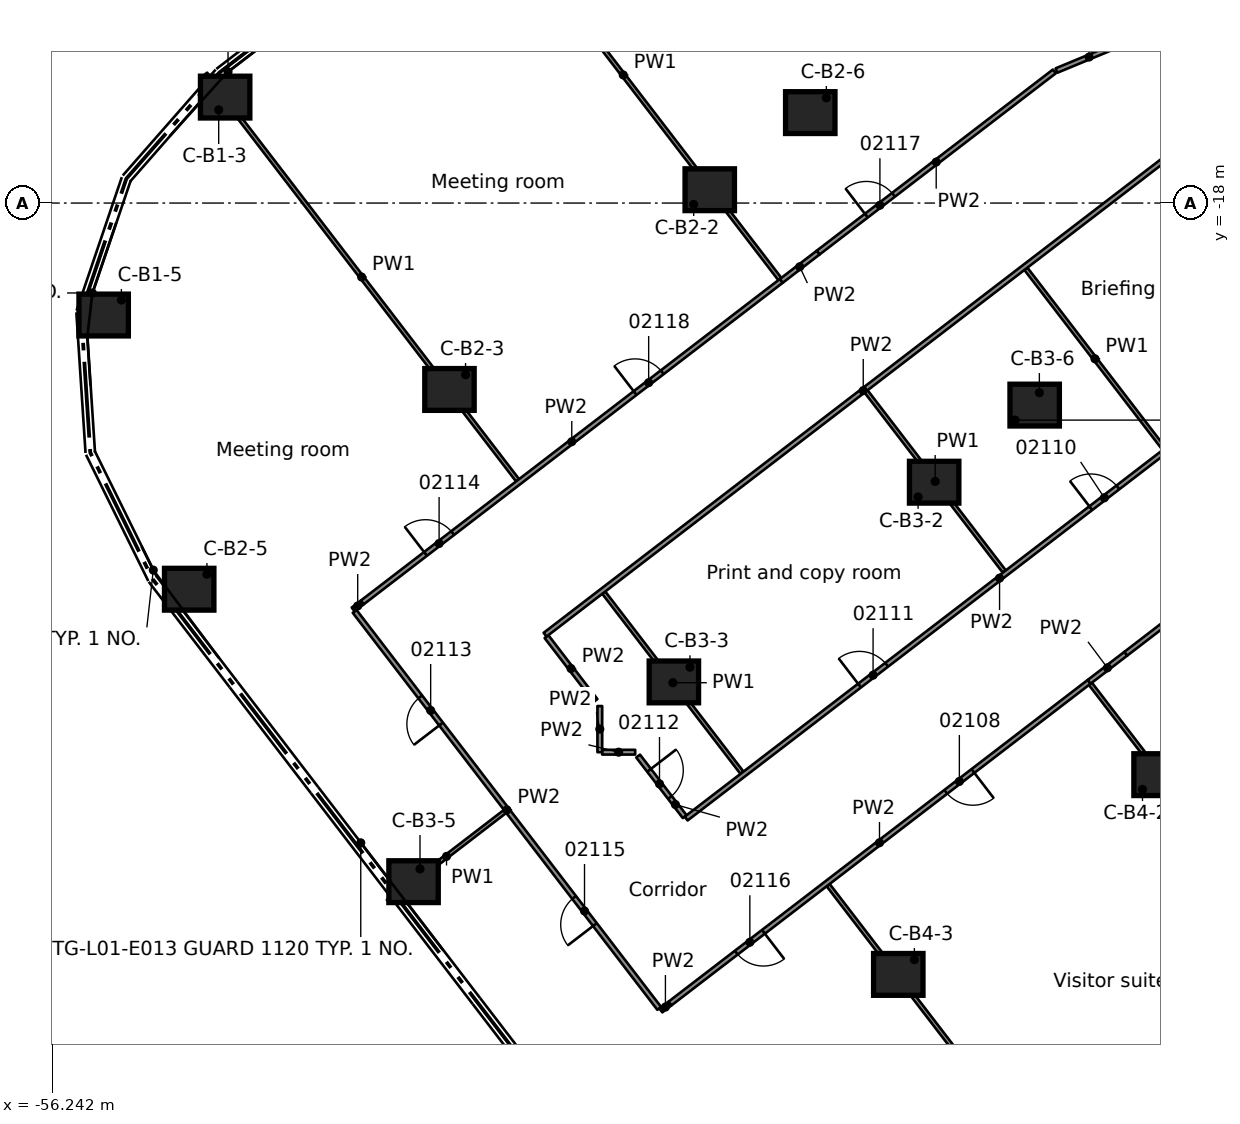
"""IFC4 building model, lengths in metres.
Left out: names, types, materials, properties, quantities, classifications, styles, units other than length and angle.
Written with IfcOpenShell. Run it as: python <this file> out.ifc"""

import sys

from ifc_helpers import new_model, si_unit, direction, frame, frame_2d, origin, origin_2d, place, context, subcontext, project, spatial, rectangle, extrude, element, fill, save


model = new_model("IFC4")
c1 = context("Model", 3, precision=1e-05, world=origin(), true_north=direction((0.0, 1.0)))
c2 = subcontext(c1, "Body", "Model", "MODEL_VIEW")
j1 = project(units=[si_unit("LENGTHUNIT", "METRE"), si_unit("PLANEANGLEUNIT", "RADIAN")], contexts=[c1])
p1 = place(None, origin())
s1 = spatial("IfcSite", under=j1, at=p1, CompositionType="ELEMENT")
p2 = place(p1, origin())
s2 = spatial("IfcBuilding", under=s1, at=p2, CompositionType="ELEMENT")
p3 = place(p2, frame((0.0, 0.0, 10.5)))
s3 = spatial("IfcBuildingStorey", under=s2, at=p3, CompositionType="ELEMENT", Elevation=10.5)
for number, where, z_axis, x_axis in (
    (1, (-51.687, -15.212, -1.0), (0.0, 0.0, 1.0), (0.707, 0.707, 0.0)),
    (2, (-54.884, -20.946, -1.0), (0.0, 0.0, 1.0), (0.707, 0.707, 0.0)),
):
    element("IfcColumn", number, at=place(p3, frame(where, z_axis=z_axis, x_axis=x_axis)), inside=s3, PredefinedType="COLUMN", context=c2, shape_type="SweptSolid", body=[
        extrude(rectangle(XDim=3.4, YDim=3.4, at=origin_2d()), origin(), (0.0, 0.0, 1.0), 1.0),
    ])
p4 = place(p3, frame((-38.935, -17.649, -1.0), z_axis=(0.0, 0.0, 1.0), x_axis=(0.707106781187, 0.707106781187, 0.0)))
e3 = element("IfcColumn", 3, at=p4, inside=s3, PredefinedType="COLUMN", context=c2, shape_type="SweptSolid", body=[
    extrude(rectangle(XDim=3.25, YDim=3.25, at=origin_2d()), origin(), (0.0, 0.0, 1.0), 1.0),
])
for number, where, z_axis, x_axis in (
    (4, (-45.784, -22.905, -1.0), (0.0, 0.0, 1.0), (0.707, 0.707, 0.0)),
    (5, (-52.633, -28.161, -1.0), (0.0, 0.0, 1.0), (0.707, 0.707, 0.0)),
):
    element("IfcColumn", number, at=place(p3, frame(where, z_axis=z_axis, x_axis=x_axis)), inside=s3, PredefinedType="COLUMN", context=c2, shape_type="SweptSolid", body=[
        extrude(rectangle(XDim=3.4, YDim=3.4, at=origin_2d()), origin(), (0.0, 0.0, 1.0), 1.0),
    ])
for number, where, z_axis, x_axis in (
    (6, (-36.29, -15.62, -1.0), (0.0, 0.0, 1.0), (0.707, 0.707, 0.0)),
    (7, (-33.03, -25.345, -1.0), (0.0, 0.0, 1.0), (0.707, 0.707, 0.0)),
):
    element("IfcColumn", number, at=place(p3, frame(where, z_axis=z_axis, x_axis=x_axis)), inside=s3, PredefinedType="COLUMN", context=c2, shape_type="SweptSolid", body=[
        extrude(rectangle(XDim=3.25, YDim=3.25, at=origin_2d()), origin(), (0.0, 0.0, 1.0), 1.0),
    ])
for number, where, z_axis, x_axis in (
    (8, (-39.879, -30.6, -1.0), (0.0, 0.0, 1.0), (0.707, 0.707, 0.0)),
    (9, (-46.729, -35.856, -1.0), (0.0, 0.0, 1.0), (0.707, 0.707, 0.0)),
):
    element("IfcColumn", number, at=place(p3, frame(where, z_axis=z_axis, x_axis=x_axis)), inside=s3, PredefinedType="COLUMN", context=c2, shape_type="SweptSolid", body=[
        extrude(rectangle(XDim=3.4, YDim=3.4, at=origin_2d()), origin(), (0.0, 0.0, 1.0), 1.0),
    ])
for number, where, z_axis, x_axis in (
    (10, (-30.385, -23.316, -1.0), (0.0, 0.0, 1.0), (0.707, 0.707, 0.0)),
    (11, (-27.125, -33.04, -1.0), (0.0, 0.0, 1.0), (0.707, 0.707, 0.0)),
):
    element("IfcColumn", number, at=place(p3, frame(where, z_axis=z_axis, x_axis=x_axis)), inside=s3, PredefinedType="COLUMN", context=c2, shape_type="SweptSolid", body=[
        extrude(rectangle(XDim=3.25, YDim=3.25, at=origin_2d()), origin(), (0.0, 0.0, 1.0), 1.0),
    ])
for number, where, z_axis, x_axis in (
    (12, (-33.974, -38.296, -1.0), (0.0, 0.0, 1.0), (0.707, 0.707, 0.0)),
    (13, (-29.4, -12.178, -1.0), (0.0, 0.0, 1.0), (0.707, 0.707, 0.0)),
):
    element("IfcColumn", number, at=place(p3, frame(where, z_axis=z_axis, x_axis=x_axis)), inside=s3, PredefinedType="COLUMN", context=c2, shape_type="SweptSolid", body=[
        extrude(rectangle(XDim=3.4, YDim=3.4, at=origin_2d()), origin(), (0.0, 0.0, 1.0), 1.0),
    ])
for number, where, z_axis, x_axis in (
    (14, (-51.687, -15.212, 0.0), (0.0, 0.0, 1.0), (1.0, 0.0, 0.0)),
    (15, (-54.884, -20.946, 0.0), (0.0, 0.0, 1.0), (1.0, 0.0, 0.0)),
    (16, (-38.935, -17.649, 0.0), (0.0, 0.0, 1.0), (1.0, 0.0, 0.0)),
    (17, (-45.784, -22.905, 0.0), (0.0, 0.0, 1.0), (1.0, 0.0, 0.0)),
    (18, (-52.633, -28.161, 0.0), (0.0, 0.0, 1.0), (1.0, 0.0, 0.0)),
    (19, (-36.29, -15.62, 0.0), (0.0, 0.0, 1.0), (1.0, 0.0, 0.0)),
    (20, (-33.03, -25.345, 0.0), (0.0, 0.0, 1.0), (1.0, 0.0, 0.0)),
    (21, (-39.879, -30.6, 0.0), (0.0, 0.0, 1.0), (1.0, 0.0, 0.0)),
    (22, (-46.729, -35.856, 0.0), (0.0, 0.0, 1.0), (1.0, 0.0, 0.0)),
    (23, (-30.385, -23.316, 0.0), (0.0, 0.0, 1.0), (1.0, 0.0, 0.0)),
    (24, (-27.125, -33.04, 0.0), (0.0, 0.0, 1.0), (1.0, 0.0, 0.0)),
    (25, (-33.974, -38.296, 0.0), (0.0, 0.0, 1.0), (1.0, 0.0, 0.0)),
):
    element("IfcColumn", number, at=place(p3, frame(where, z_axis=z_axis, x_axis=x_axis)), inside=s3, PredefinedType="COLUMN", context=c2, shape_type="SweptSolid", body=[
        extrude(rectangle(XDim=1.3, YDim=1.1, at=origin_2d()), origin(), (0.0, 0.0, 1.0), 5.0),
    ])
p5 = place(p3, frame((-40.264, -39.191, 0.0), z_axis=(0.0, 0.0, 1.0), x_axis=(-0.608717571556, 0.793386991373, 0.0)))
e26 = element("IfcWall", 26, at=p5, inside=s3, PredefinedType="PARTITIONING", context=c2, shape_type="SweptSolid", body=[
    extrude(rectangle(XDim=13.169, YDim=0.125, at=frame_2d((6.584, 0.0))), origin(), (0.0, 0.0, 1.0), 4.58),
])
p6 = place(p5, frame((9.431, 0.0, 0.0)))
e27 = element("IfcOpeningElement", 27, at=p6, cuts=e26, PredefinedType="OPENING", context=c2, shape_type="SweptSolid", body=[
    extrude(rectangle(XDim=0.9, YDim=2.1, at=frame_2d((0.45, 1.05))), frame((0.0, 0.073, 0.0), z_axis=(0.0, -1.0, 0.0), x_axis=(1.0, 0.0, 0.0)), (0.0, 0.0, 1.0), 0.145),
])
p7 = place(p5, frame((2.781, 0.0, 0.0)))
e28 = element("IfcOpeningElement", 28, at=p7, cuts=e26, PredefinedType="OPENING", context=c2, shape_type="SweptSolid", body=[
    extrude(rectangle(XDim=0.9, YDim=2.1, at=frame_2d((0.45, 1.05))), frame((0.0, 0.073, 0.0), z_axis=(0.0, -1.0, 0.0), x_axis=(1.0, 0.0, 0.0)), (0.0, 0.0, 1.0), 0.145),
])
p8 = place(p3, frame((-43.231, -29.408, 0.0), z_axis=(0.0, 0.0, 1.0), x_axis=(0.608774942854, -0.79334297057, 0.0)))
e29 = element("IfcWall", 29, at=p8, inside=s3, PredefinedType="PARTITIONING", context=c2, shape_type="SweptSolid", body=[
    extrude(rectangle(XDim=2.119, YDim=0.125, at=frame_2d((1.06, 0.0))), origin(), (0.0, 0.0, 1.0), 4.58),
])
p9 = place(p3, frame((-40.82, -32.551, 0.0), z_axis=(0.0, 0.0, 1.0), x_axis=(0.609452676656, -0.792822448545, 0.0)))
e30 = element("IfcWall", 30, at=p9, inside=s3, PredefinedType="PARTITIONING", context=c2, shape_type="SweptSolid", body=[
    extrude(rectangle(XDim=2.012, YDim=0.125, at=frame_2d((1.006, 0.0))), origin(), (0.0, 0.0, 1.0), 4.58),
])
p10 = place(p9, frame((0.473, 0.0, 0.0)))
e31 = element("IfcOpeningElement", 31, at=p10, cuts=e30, PredefinedType="OPENING", context=c2, shape_type="SweptSolid", body=[
    extrude(rectangle(XDim=0.9, YDim=2.1, at=frame_2d((0.45, 1.05))), frame((0.0, 0.073, 0.0), z_axis=(0.0, -1.0, 0.0), x_axis=(1.0, 0.0, 0.0)), (0.0, 0.0, 1.0), 0.145),
])
p11 = place(p3, frame((-52.2, -14.599, 0.0), z_axis=(0.0, 0.0, 1.0), x_axis=(0.608835217765, -0.793296714735, 0.0)))
e32 = element("IfcWall", 32, at=p11, inside=s3, PredefinedType="PARTITIONING", context=c2, shape_type="SweptSolid", body=[
    extrude(rectangle(XDim=13.481, YDim=0.1, at=frame_2d((6.741, 0.0))), origin(), (0.0, 0.0, 1.0), 4.58),
])
p12 = place(p3, frame((-41.724, -28.252, 0.0), z_axis=(0.0, 0.0, 1.0), x_axis=(0.608928252062, -0.793225304589, 0.0)))
e33 = element("IfcWall", 33, at=p12, inside=s3, PredefinedType="PARTITIONING", context=c2, shape_type="SweptSolid", body=[
    extrude(rectangle(XDim=5.973, YDim=0.1, at=frame_2d((2.987, 0.0))), origin(), (0.0, 0.0, 1.0), 4.58),
])
p13 = place(p3, frame((-35.819, -35.947, 0.0), z_axis=(0.0, 0.0, 1.0), x_axis=(0.608745897366, -0.793365257898, 0.0)))
e34 = element("IfcWall", 34, at=p13, inside=s3, PredefinedType="PARTITIONING", context=c2, shape_type="SweptSolid", body=[
    extrude(rectangle(XDim=13.482, YDim=0.1, at=frame_2d((6.741, 0.0))), origin(), (0.0, 0.0, 1.0), 4.58),
])
p14 = place(p3, frame((-45.332, -9.26, 0.0), z_axis=(0.0, 0.0, 1.0), x_axis=(0.608825648604, -0.793304058733, 0.0)))
e35 = element("IfcWall", 35, at=p14, inside=s3, PredefinedType="PARTITIONING", context=c2, shape_type="SweptSolid", body=[
    extrude(rectangle(XDim=13.536, YDim=0.1, at=frame_2d((6.768, 0.0))), origin(), (0.0, 0.0, 1.0), 4.58),
])
p15 = place(p3, frame((-34.822, -22.955, 0.0), z_axis=(0.0, 0.0, 1.0), x_axis=(0.608823570319, -0.79330565372, 0.0)))
e36 = element("IfcWall", 36, at=p15, inside=s3, PredefinedType="PARTITIONING", context=c2, shape_type="SweptSolid", body=[
    extrude(rectangle(XDim=5.974, YDim=0.1, at=frame_2d((2.987, 0.0))), origin(), (0.0, 0.0, 1.0), 4.58),
])
p16 = place(p3, frame((-28.917, -30.652, 0.0), z_axis=(0.0, 0.0, 1.0), x_axis=(0.608788953199, -0.793332219478, 0.0)))
e37 = element("IfcWall", 37, at=p16, inside=s3, PredefinedType="PARTITIONING", context=c2, shape_type="SweptSolid", body=[
    extrude(rectangle(XDim=13.535, YDim=0.1, at=frame_2d((6.768, 0.0))), origin(), (0.0, 0.0, 1.0), 4.58),
])
p17 = place(p3, frame((-30.617, -19.729, 0.0), z_axis=(0.0, 0.0, 1.0), x_axis=(0.608902533452, -0.793245047104, 0.0)))
e38 = element("IfcWall", 38, at=p17, inside=s3, PredefinedType="PARTITIONING", context=c2, shape_type="SweptSolid", body=[
    extrude(rectangle(XDim=5.973, YDim=0.1, at=frame_2d((2.986, 0.0))), origin(), (0.0, 0.0, 1.0), 4.58),
])
p18 = place(p3, frame((-41.766, -32.449, 0.0), z_axis=(0.0, 0.0, 1.0), x_axis=(1.0, 0.0, 0.0)))
e39 = element("IfcWall", 39, at=p18, inside=s3, PredefinedType="PARTITIONING", context=c2, shape_type="SweptSolid", body=[
    extrude(rectangle(XDim=0.869, YDim=0.125, at=frame_2d((0.435, 0.0))), origin(), (0.0, 0.0, 1.0), 4.58),
])
p19 = place(p3, frame((-29.81, -14.513, 0.0), z_axis=(0.0, 0.0, 1.0), x_axis=(0.923811400228, 0.382847876851, 0.0)))
e40 = element("IfcWall", 40, at=p19, inside=s3, PredefinedType="PARTITIONING", context=c2, shape_type="SweptSolid", body=[
    extrude(rectangle(XDim=1.854, YDim=0.125, at=frame_2d((0.927, 0.0))), origin(), (0.0, 0.0, 1.0), 4.58),
])
p20 = place(p3, frame((-40.221, -39.245, 0.0), z_axis=(0.0, 0.0, 1.0), x_axis=(0.79539441782, 0.606092171291, 0.0)))
e41 = element("IfcWall", 41, at=p20, inside=s3, PredefinedType="PARTITIONING", context=c2, shape_type="SweptSolid", body=[
    extrude(rectangle(XDim=0.301, YDim=0.125, at=frame_2d((0.15, 0.0))), origin(), (0.0, 0.0, 1.0), 4.58),
])
p21 = place(p3, frame((-28.955, -30.6, 0.0), z_axis=(0.0, 0.0, 1.0), x_axis=(0.793590253862, 0.608452552772, 0.0)))
e42 = element("IfcWall", 42, at=p21, inside=s3, PredefinedType="PARTITIONING", context=c2, shape_type="SweptSolid", body=[
    extrude(rectangle(XDim=1.22, YDim=0.125, at=frame_2d((0.61, 0.0))), origin(), (0.0, 0.0, 1.0), 4.58),
])
p22 = place(p3, frame((-28.955, -30.6, 0.0), z_axis=(0.0, 0.0, 1.0), x_axis=(-0.793294727074, -0.608837807627, 0.0)))
e43 = element("IfcWall", 43, at=p22, inside=s3, PredefinedType="PARTITIONING", context=c2, shape_type="SweptSolid", body=[
    extrude(rectangle(XDim=13.9, YDim=0.125, at=frame_2d((6.95, 0.0))), origin(), (0.0, 0.0, 1.0), 4.58),
])
p23 = place(p22, frame((3.851, 0.0, 0.0)))
e44 = element("IfcOpeningElement", 44, at=p23, cuts=e43, PredefinedType="OPENING", context=c2, shape_type="SweptSolid", body=[
    extrude(rectangle(XDim=0.9, YDim=2.1, at=frame_2d((0.45, 1.05))), frame((0.0, 0.073, 0.0), z_axis=(0.0, -1.0, 0.0), x_axis=(1.0, 0.0, 0.0)), (0.0, 0.0, 1.0), 0.145),
])
p24 = place(p22, frame((10.801, 0.0, 0.0)))
e45 = element("IfcOpeningElement", 45, at=p24, cuts=e43, PredefinedType="OPENING", context=c2, shape_type="SweptSolid", body=[
    extrude(rectangle(XDim=0.9, YDim=2.1, at=frame_2d((0.45, 1.05))), frame((0.0, 0.073, 0.0), z_axis=(0.0, -1.0, 0.0), x_axis=(1.0, 0.0, 0.0)), (0.0, 0.0, 1.0), 0.145),
])
p25 = place(p3, frame((-20.567, -24.164, 0.0), z_axis=(0.0, 0.0, 1.0), x_axis=(-0.793345387212, -0.608771793523, 0.0)))
e46 = element("IfcWall", 46, at=p25, inside=s3, PredefinedType="PARTITIONING", context=c2, shape_type="SweptSolid", body=[
    extrude(rectangle(XDim=9.353, YDim=0.125, at=frame_2d((4.677, 0.0))), origin(), (0.0, 0.0, 1.0), 4.58),
])
p26 = place(p25, frame((6.373, 0.0, 0.0)))
e47 = element("IfcOpeningElement", 47, at=p26, cuts=e46, PredefinedType="OPENING", context=c2, shape_type="SweptSolid", body=[
    extrude(rectangle(XDim=1.8, YDim=2.1, at=frame_2d((0.9, 1.05))), frame((0.0, 0.073, 0.0), z_axis=(0.0, -1.0, 0.0), x_axis=(1.0, 0.0, 0.0)), (0.0, 0.0, 1.0), 0.145),
])
p27 = place(p3, frame((-39.556, -34.196, 0.0), z_axis=(0.0, 0.0, 1.0), x_axis=(0.793448872505, 0.608636908773, 0.0)))
e48 = element("IfcWall", 48, at=p27, inside=s3, PredefinedType="PARTITIONING", context=c2, shape_type="SweptSolid", body=[
    extrude(rectangle(XDim=20.788, YDim=0.125, at=frame_2d((10.394, 0.0))), origin(), (0.0, 0.0, 1.0), 4.58),
])
p28 = place(p27, frame((18.0, 0.0, 0.0)))
e49 = element("IfcOpeningElement", 49, at=p28, cuts=e48, PredefinedType="OPENING", context=c2, shape_type="SweptSolid", body=[
    extrude(rectangle(XDim=0.9, YDim=2.1, at=frame_2d((0.45, 1.05))), frame((0.0, 0.073, 0.0), z_axis=(0.0, -1.0, 0.0), x_axis=(1.0, 0.0, 0.0)), (0.0, 0.0, 1.0), 0.145),
])
p29 = place(p27, frame((13.419, 0.0, 0.0)))
e50 = element("IfcOpeningElement", 50, at=p29, cuts=e48, PredefinedType="OPENING", context=c2, shape_type="SweptSolid", body=[
    extrude(rectangle(XDim=0.9, YDim=2.1, at=frame_2d((0.45, 1.05))), frame((0.0, 0.073, 0.0), z_axis=(0.0, -1.0, 0.0), x_axis=(1.0, 0.0, 0.0)), (0.0, 0.0, 1.0), 0.145),
])
p30 = place(p27, frame((5.749, 0.0, 0.0)))
e51 = element("IfcOpeningElement", 51, at=p30, cuts=e48, PredefinedType="OPENING", context=c2, shape_type="SweptSolid", body=[
    extrude(rectangle(XDim=0.9, YDim=2.1, at=frame_2d((0.45, 1.05))), frame((0.0, 0.073, 0.0), z_axis=(0.0, -1.0, 0.0), x_axis=(1.0, 0.0, 0.0)), (0.0, 0.0, 1.0), 0.145),
])
p31 = place(p3, frame((-47.403, -36.374, 0.0), z_axis=(0.0, 0.0, 1.0), x_axis=(0.793195723927, 0.608966783613, 0.0)))
e52 = element("IfcWall", 52, at=p31, inside=s3, PredefinedType="PARTITIONING", context=c2, shape_type="SweptSolid", body=[
    extrude(rectangle(XDim=3.887, YDim=0.1, at=frame_2d((1.943, 0.0))), origin(), (0.0, 0.0, 1.0), 4.58),
])
p32 = place(p3, frame((-43.269, -29.358, 0.0), z_axis=(0.0, 0.0, 1.0), x_axis=(0.793439885471, 0.608648624531, 0.0)))
e53 = element("IfcWall", 53, at=p32, inside=s3, PredefinedType="PARTITIONING", context=c2, shape_type="SweptSolid", body=[
    extrude(rectangle(XDim=21.106, YDim=0.125, at=frame_2d((10.553, 0.0))), origin(), (0.0, 0.0, 1.0), 4.58),
])
p33 = place(p3, frame((-48.08, -28.51, 0.0), z_axis=(0.0, 0.0, 1.0), x_axis=(0.793361206696, 0.608751177173, 0.0)))
e54 = element("IfcWall", 54, at=p33, inside=s3, PredefinedType="PARTITIONING", context=c2, shape_type="SweptSolid", body=[
    extrude(rectangle(XDim=13.9, YDim=0.125, at=frame_2d((6.95, 0.0))), origin(), (0.0, 0.0, 1.0), 4.58),
])
p34 = place(p33, frame((2.1, 0.0, 0.0)))
e55 = element("IfcOpeningElement", 55, at=p34, cuts=e54, PredefinedType="OPENING", context=c2, shape_type="SweptSolid", body=[
    extrude(rectangle(XDim=0.9, YDim=2.1, at=frame_2d((0.45, 1.05))), frame((0.0, 0.073, 0.0), z_axis=(0.0, -1.0, 0.0), x_axis=(1.0, 0.0, 0.0)), (0.0, 0.0, 1.0), 0.145),
])
p35 = place(p33, frame((9.051, 0.0, 0.0)))
e56 = element("IfcOpeningElement", 56, at=p35, cuts=e54, PredefinedType="OPENING", context=c2, shape_type="SweptSolid", body=[
    extrude(rectangle(XDim=0.9, YDim=2.1, at=frame_2d((0.45, 1.05))), frame((0.0, 0.073, 0.0), z_axis=(0.0, -1.0, 0.0), x_axis=(1.0, 0.0, 0.0)), (0.0, 0.0, 1.0), 0.145),
])
p36 = place(p3, frame((-36.084, -19.305, 0.0), z_axis=(0.0, 0.0, 1.0), x_axis=(0.793472416576, 0.60860621434, 0.0)))
e57 = element("IfcWall", 57, at=p36, inside=s3, PredefinedType="PARTITIONING", context=c2, shape_type="SweptSolid", body=[
    extrude(rectangle(XDim=7.834, YDim=0.125, at=frame_2d((3.917, 0.0))), origin(), (0.0, 0.0, 1.0), 4.58),
])
p37 = place(p36, frame((1.6, 0.0, 0.0)))
e58 = element("IfcOpeningElement", 58, at=p37, cuts=e57, PredefinedType="OPENING", context=c2, shape_type="SweptSolid", body=[
    extrude(rectangle(XDim=0.9, YDim=2.1, at=frame_2d((0.45, 1.05))), frame((0.0, 0.073, 0.0), z_axis=(0.0, -1.0, 0.0), x_axis=(1.0, 0.0, 0.0)), (0.0, 0.0, 1.0), 0.145),
])
p38 = place(p3, frame((-37.051, -20.048, 0.0), z_axis=(0.0, 0.0, 1.0), x_axis=(0.792906683767, 0.60934308139, 0.0)))
e59 = element("IfcWall", 59, at=p38, inside=s3, PredefinedType="PARTITIONING", context=c2, shape_type="SweptSolid", body=[
    extrude(rectangle(XDim=1.22, YDim=0.125, at=frame_2d((0.61, 0.0))), origin(), (0.0, 0.0, 1.0), 4.58),
])
p39 = place(p3, frame((-48.318, -28.693, 0.0), z_axis=(0.0, 0.0, 1.0), x_axis=(0.792623989105, 0.60971076085, 0.0)))
e60 = element("IfcWall", 60, at=p39, inside=s3, PredefinedType="PARTITIONING", context=c2, shape_type="SweptSolid", body=[
    extrude(rectangle(XDim=0.3, YDim=0.125, at=frame_2d((0.15, 0.0))), origin(), (0.0, 0.0, 1.0), 4.58),
])
p40 = place(p3, frame((-41.828, -32.449, 0.0), z_axis=(0.0, 0.0, 1.0), x_axis=(0.0, 1.0, 0.0)))
e61 = element("IfcWall", 61, at=p40, inside=s3, PredefinedType="PARTITIONING", context=c2, shape_type="SweptSolid", body=[
    extrude(rectangle(XDim=1.214, YDim=0.125, at=frame_2d((0.607, 0.0))), origin(), (0.0, 0.0, 1.0), 4.58),
])
p41 = place(p23, origin())
e62 = element("IfcDoor", 62, at=p41, inside=s3, OperationType="SINGLE_SWING_LEFT", PredefinedType="DOOR", context=c2, shape_type="SweptSolid", body=[
    extrude(rectangle(XDim=0.9, YDim=2.1, at=frame_2d((0.45, 1.05))), frame((0.0, 0.025, 0.0), z_axis=(0.0, -1.0, 0.0), x_axis=(1.0, 0.0, 0.0)), (0.0, 0.0, 1.0), 0.05),
])
fill(e44, e62)
p42 = place(p29, origin())
e63 = element("IfcDoor", 63, at=p42, inside=s3, OperationType="SINGLE_SWING_RIGHT", PredefinedType="DOOR", context=c2, shape_type="SweptSolid", body=[
    extrude(rectangle(XDim=0.9, YDim=2.1, at=frame_2d((0.45, 1.05))), frame((0.0, 0.025, 0.0), z_axis=(0.0, -1.0, 0.0), x_axis=(1.0, 0.0, 0.0)), (0.0, 0.0, 1.0), 0.05),
])
fill(e50, e63)
p43 = place(p30, origin())
e64 = element("IfcDoor", 64, at=p43, inside=s3, OperationType="SINGLE_SWING_LEFT", PredefinedType="DOOR", context=c2, shape_type="SweptSolid", body=[
    extrude(rectangle(XDim=0.9, YDim=2.1, at=frame_2d((0.45, 1.05))), frame((0.0, 0.025, 0.0), z_axis=(0.0, -1.0, 0.0), x_axis=(1.0, 0.0, 0.0)), (0.0, 0.0, 1.0), 0.05),
])
fill(e51, e64)
p44 = place(p10, origin())
e65 = element("IfcDoor", 65, at=p44, inside=s3, OperationType="SINGLE_SWING_LEFT", PredefinedType="DOOR", context=c2, shape_type="SweptSolid", body=[
    extrude(rectangle(XDim=0.9, YDim=2.1, at=frame_2d((0.45, 1.05))), frame((0.0, 0.025, 0.0), z_axis=(0.0, -1.0, 0.0), x_axis=(1.0, 0.0, 0.0)), (0.0, 0.0, 1.0), 0.05),
])
fill(e31, e65)
p45 = place(p6, origin())
e66 = element("IfcDoor", 66, at=p45, inside=s3, OperationType="SINGLE_SWING_RIGHT", PredefinedType="DOOR", context=c2, shape_type="SweptSolid", body=[
    extrude(rectangle(XDim=0.9, YDim=2.1, at=frame_2d((0.45, 1.05))), frame((0.0, 0.025, 0.0), z_axis=(0.0, -1.0, 0.0), x_axis=(1.0, 0.0, 0.0)), (0.0, 0.0, 1.0), 0.05),
])
fill(e27, e66)
p46 = place(p34, origin())
e67 = element("IfcDoor", 67, at=p46, inside=s3, OperationType="SINGLE_SWING_LEFT", PredefinedType="DOOR", context=c2, shape_type="SweptSolid", body=[
    extrude(rectangle(XDim=0.9, YDim=2.1, at=frame_2d((0.45, 1.05))), frame((0.0, 0.025, 0.0), z_axis=(0.0, -1.0, 0.0), x_axis=(1.0, 0.0, 0.0)), (0.0, 0.0, 1.0), 0.05),
])
fill(e55, e67)
p47 = place(p7, origin())
e68 = element("IfcDoor", 68, at=p47, inside=s3, OperationType="SINGLE_SWING_LEFT", PredefinedType="DOOR", context=c2, shape_type="SweptSolid", body=[
    extrude(rectangle(XDim=0.9, YDim=2.1, at=frame_2d((0.45, 1.05))), frame((0.0, 0.025, 0.0), z_axis=(0.0, -1.0, 0.0), x_axis=(1.0, 0.0, 0.0)), (0.0, 0.0, 1.0), 0.05),
])
fill(e28, e68)
p48 = place(p24, origin())
e69 = element("IfcDoor", 69, at=p48, inside=s3, OperationType="SINGLE_SWING_RIGHT", PredefinedType="DOOR", context=c2, shape_type="SweptSolid", body=[
    extrude(rectangle(XDim=0.9, YDim=2.1, at=frame_2d((0.45, 1.05))), frame((0.0, 0.025, 0.0), z_axis=(0.0, -1.0, 0.0), x_axis=(1.0, 0.0, 0.0)), (0.0, 0.0, 1.0), 0.05),
])
fill(e45, e69)
p49 = place(p37, origin())
e70 = element("IfcDoor", 70, at=p49, inside=s3, OperationType="SINGLE_SWING_LEFT", PredefinedType="DOOR", context=c2, shape_type="SweptSolid", body=[
    extrude(rectangle(XDim=0.9, YDim=2.1, at=frame_2d((0.45, 1.05))), frame((0.0, 0.025, 0.0), z_axis=(0.0, -1.0, 0.0), x_axis=(1.0, 0.0, 0.0)), (0.0, 0.0, 1.0), 0.05),
])
fill(e58, e70)
p50 = place(p35, origin())
e71 = element("IfcDoor", 71, at=p50, inside=s3, OperationType="SINGLE_SWING_RIGHT", PredefinedType="DOOR", context=c2, shape_type="SweptSolid", body=[
    extrude(rectangle(XDim=0.9, YDim=2.1, at=frame_2d((0.45, 1.05))), frame((0.0, 0.025, 0.0), z_axis=(0.0, -1.0, 0.0), x_axis=(1.0, 0.0, 0.0)), (0.0, 0.0, 1.0), 0.05),
])
fill(e56, e71)
save(model, sys.argv[1])
